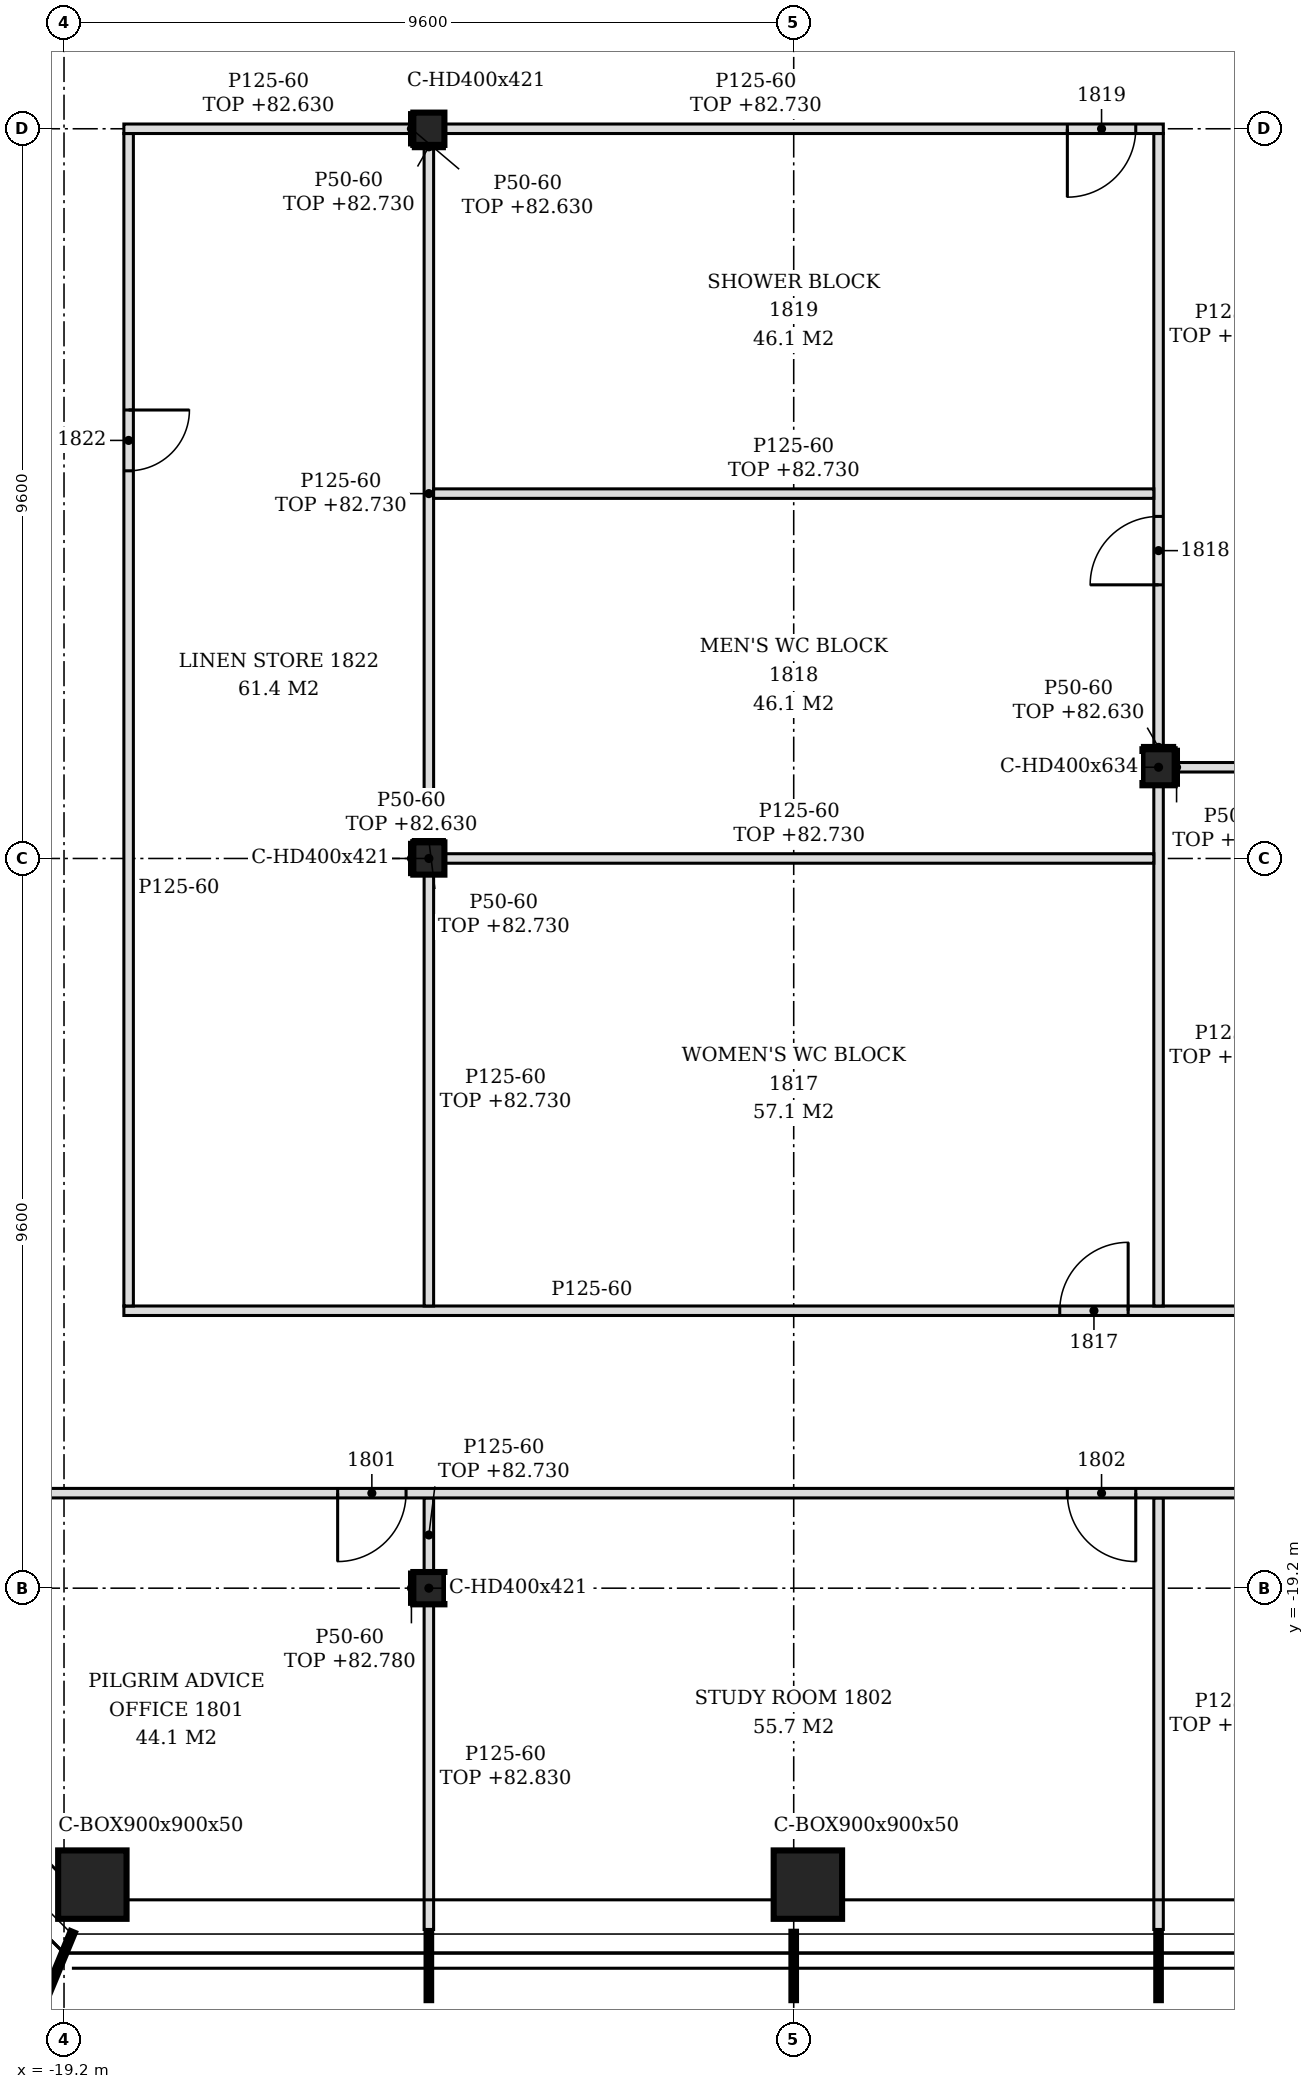
"""IFC4 building model, lengths in metres.
Left out: names, types, materials, properties, quantities, classifications, styles, units other than length and angle.
Written with IfcOpenShell. Run it as: python <this file> out.ifc"""

import sys

from ifc_helpers import new_model, si_unit, direction, frame, frame_2d, origin, origin_2d, place, context, subcontext, project, spatial, polyline, rectangle, hollow_rectangle, i_section, outline, extrude, element, fill, save


model = new_model("IFC4")
c1 = context("Model", 3, precision=1e-05, world=origin(), true_north=direction((0.0, 1.0)))
c2 = subcontext(c1, "Body", "Model", "MODEL_VIEW")
j1 = project(units=[si_unit("LENGTHUNIT", "METRE"), si_unit("PLANEANGLEUNIT", "RADIAN")], contexts=[c1])
p1 = place(None, origin())
s1 = spatial("IfcSite", under=j1, at=p1, CompositionType="ELEMENT")
p2 = place(p1, origin())
s2 = spatial("IfcBuilding", under=s1, at=p2, CompositionType="ELEMENT")
p3 = place(p2, frame((0.0, 0.0, 79.8)))
s3 = spatial("IfcBuildingStorey", under=s2, at=p3, CompositionType="ELEMENT", Elevation=79.8)
for number, where, z_axis, x_axis in (
    (1, (-18.827, -23.1, -0.15), (0.0, 0.0, 1.0), (1.0, 0.0, 0.0)),
    (2, (-9.414, -23.1, -0.15), (0.0, 0.0, 1.0), (1.0, 0.0, 0.0)),
):
    element("IfcColumn", number, at=place(p3, frame(where, z_axis=z_axis, x_axis=x_axis)), inside=s3, PredefinedType="COLUMN", context=c2, shape_type="SweptSolid", body=[
        extrude(hollow_rectangle(XDim=0.9, YDim=0.9, WallThickness=0.05, at=origin_2d()), origin(), (0.0, 0.0, 1.0), 3.6),
    ])
p4 = place(p3, frame((-4.8, -8.4, -0.15), z_axis=(0.0, 0.0, 1.0), x_axis=(1.0, 0.0, 0.0)))
e3 = element("IfcColumn", 3, at=p4, inside=s3, PredefinedType="COLUMN", context=c2, shape_type="SweptSolid", body=[
    extrude(i_section(OverallWidth=0.424, OverallDepth=0.474, WebThickness=0.048, FlangeThickness=0.077, FilletRadius=0.015, at=origin_2d()), origin(), (0.0, 0.0, 1.0), 3.6),
])
for number, where, z_axis, x_axis in (
    (4, (-14.4, -19.2, -0.15), (0.0, 0.0, 1.0), (1.0, 0.0, 0.0)),
    (5, (-14.4, -9.6, -0.15), (0.0, 0.0, 1.0), (1.0, 0.0, 0.0)),
    (6, (-14.4, 0.0, -0.15), (0.0, 0.0, 1.0), (1.0, 0.0, 0.0)),
):
    element("IfcColumn", number, at=place(p3, frame(where, z_axis=z_axis, x_axis=x_axis)), inside=s3, PredefinedType="COLUMN", context=c2, shape_type="SweptSolid", body=[
        extrude(i_section(OverallWidth=0.409, OverallDepth=0.425, WebThickness=0.033, FlangeThickness=0.052, FilletRadius=0.015, at=origin_2d()), origin(), (0.0, 0.0, 1.0), 3.6),
    ])
p5 = place(p3, frame((-14.4, -23.69, 0.0), z_axis=(0.0, 0.0, 1.0), x_axis=(0.0, 1.0, 0.0)))
e7 = element("IfcWall", 7, at=p5, inside=s3, PredefinedType="PARTITIONING", context=c2, shape_type="SweptSolid", body=[
    extrude(outline(polyline([(0.0, 0.0), (4.277, 0.0), (4.278, 3.03), (0.74, 3.03), (0.738, 2.93), (0.44, 2.93), (0.438, 3.03), (0.0, 3.03), (0.0, 0.0)])), frame((0.0, 0.062, 0.0), z_axis=(0.0, -1.0, 0.0), x_axis=(1.0, 0.0, 0.0)), (0.0, 0.0, 1.0), 0.125),
])
p6 = place(p3, frame((-4.8, -23.69, 0.0), z_axis=(0.0, 0.0, 1.0), x_axis=(0.0, 1.0, 0.0)))
e8 = element("IfcWall", 8, at=p6, inside=s3, PredefinedType="PARTITIONING", context=c2, shape_type="SweptSolid", body=[
    extrude(rectangle(XDim=5.677, YDim=0.125, at=frame_2d((2.839, 0.0))), origin(), (0.0, 0.0, 1.0), 2.73),
])
p7 = place(p3, frame((-14.4, -18.988, 0.0), z_axis=(0.0, 0.0, 1.0), x_axis=(0.0, 1.0, 0.0)))
e9 = element("IfcWall", 9, at=p7, inside=s3, PredefinedType="PARTITIONING", context=c2, shape_type="SweptSolid", body=[
    extrude(rectangle(XDim=0.975, YDim=0.125, at=frame_2d((0.488, 0.0))), origin(), (0.0, 0.0, 1.0), 2.93),
])
p8 = place(p3, frame((-20.75, -17.95, 0.0), z_axis=(0.0, 0.0, 1.0), x_axis=(1.0, 0.0, 0.0)))
e10 = element("IfcWall", 10, at=p8, inside=s3, PredefinedType="PARTITIONING", context=c2, shape_type="SweptSolid", body=[
    extrude(outline(polyline([(0.0, 0.0), (39.887, 0.0), (39.887, 2.73), (39.8, 2.73), (39.798, 3.45), (28.1, 3.45), (28.098, 2.73), (27.8, 2.73), (27.798, 3.45), (16.1, 3.45), (16.098, 2.73), (15.8, 2.73), (15.798, 3.45), (6.5, 3.45), (6.498, 2.93), (6.2, 2.93), (6.198, 3.45), (0.0, 3.45), (0.0, 0.0)])), frame((0.0, 0.062, 0.0), z_axis=(0.0, -1.0, 0.0), x_axis=(1.0, 0.0, 0.0)), (0.0, 0.0, 1.0), 0.125),
])
p9 = place(p8, frame((5.15, 0.0, 0.0)))
e11 = element("IfcOpeningElement", 11, at=p9, cuts=e10, PredefinedType="OPENING", context=c2, shape_type="SweptSolid", body=[
    extrude(rectangle(XDim=0.9, YDim=2.1, at=frame_2d((0.45, 1.05))), frame((0.0, 0.073, 0.0), z_axis=(0.0, -1.0, 0.0), x_axis=(1.0, 0.0, 0.0)), (0.0, 0.0, 1.0), 0.145),
])
p10 = place(p8, frame((14.75, 0.0, 0.0)))
e12 = element("IfcOpeningElement", 12, at=p10, cuts=e10, PredefinedType="OPENING", context=c2, shape_type="SweptSolid", body=[
    extrude(rectangle(XDim=0.9, YDim=2.1, at=frame_2d((0.45, 1.05))), frame((0.0, 0.073, 0.0), z_axis=(0.0, -1.0, 0.0), x_axis=(1.0, 0.0, 0.0)), (0.0, 0.0, 1.0), 0.145),
])
p11 = place(p8, frame((24.35, 0.0, 0.0)))
e13 = element("IfcOpeningElement", 13, at=p11, cuts=e10, PredefinedType="OPENING", context=c2, shape_type="SweptSolid", body=[
    extrude(rectangle(XDim=0.9, YDim=2.1, at=frame_2d((0.45, 1.05))), frame((0.0, 0.073, 0.0), z_axis=(0.0, -1.0, 0.0), x_axis=(1.0, 0.0, 0.0)), (0.0, 0.0, 1.0), 0.145),
])
p12 = place(p8, frame((29.75, 0.0, 0.0)))
e14 = element("IfcOpeningElement", 14, at=p12, cuts=e10, PredefinedType="OPENING", context=c2, shape_type="SweptSolid", body=[
    extrude(rectangle(XDim=0.9, YDim=2.1, at=frame_2d((0.45, 1.05))), frame((0.0, 0.073, 0.0), z_axis=(0.0, -1.0, 0.0), x_axis=(1.0, 0.0, 0.0)), (0.0, 0.0, 1.0), 0.145),
])
p13 = place(p8, frame((35.45, 0.0, 0.0)))
e15 = element("IfcOpeningElement", 15, at=p13, cuts=e10, PredefinedType="OPENING", context=c2, shape_type="SweptSolid", body=[
    extrude(rectangle(XDim=0.9, YDim=2.1, at=frame_2d((0.45, 1.05))), frame((0.0, 0.073, 0.0), z_axis=(0.0, -1.0, 0.0), x_axis=(1.0, 0.0, 0.0)), (0.0, 0.0, 1.0), 0.145),
])
p14 = place(p3, frame((-18.413, -15.55, 0.0), z_axis=(0.0, 0.0, 1.0), x_axis=(1.0, 0.0, 0.0)))
e16 = element("IfcWall", 16, at=p14, inside=s3, PredefinedType="PARTITIONING", context=c2, shape_type="SweptSolid", body=[
    extrude(outline(polyline([(0.0, 0.0), (18.475, 0.0), (18.475, 3.45), (13.762, 3.45), (13.76, 2.73), (13.462, 2.73), (13.46, 3.45), (4.163, 3.45), (4.16, 2.93), (3.863, 2.93), (3.861, 3.45), (0.0, 3.45), (0.0, 0.0)])), frame((0.0, 0.062, 0.0), z_axis=(0.0, -1.0, 0.0), x_axis=(1.0, 0.0, 0.0)), (0.0, 0.0, 1.0), 0.125),
])
p15 = place(p14, frame((12.312, 0.0, 0.0)))
e17 = element("IfcOpeningElement", 17, at=p15, cuts=e16, PredefinedType="OPENING", context=c2, shape_type="SweptSolid", body=[
    extrude(rectangle(XDim=0.9, YDim=2.1, at=frame_2d((0.45, 1.05))), frame((0.0, 0.073, 0.0), z_axis=(0.0, -1.0, 0.0), x_axis=(1.0, 0.0, 0.0)), (0.0, 0.0, 1.0), 0.145),
])
p16 = place(p3, frame((-18.35, -15.488, 0.0), z_axis=(0.0, 0.0, 1.0), x_axis=(0.0, 1.0, 0.0)))
e18 = element("IfcWall", 18, at=p16, inside=s3, PredefinedType="PARTITIONING", context=c2, shape_type="SweptSolid", body=[
    extrude(outline(polyline([(0.0, 0.0), (15.425, 0.0), (15.425, 2.83), (15.377, 2.83), (15.375, 3.45), (10.798, 3.45), (10.795, 2.83), (10.577, 2.83), (10.575, 3.45), (5.998, 3.45), (5.996, 2.83), (5.778, 2.83), (5.775, 3.45), (1.198, 3.45), (1.196, 2.83), (0.978, 2.83), (0.976, 3.45), (0.0, 3.45), (0.0, 0.0)])), frame((0.0, 0.062, 0.0), z_axis=(0.0, -1.0, 0.0), x_axis=(1.0, 0.0, 0.0)), (0.0, 0.0, 1.0), 0.125),
])
p17 = place(p16, frame((10.988, 0.0, 0.0)))
e19 = element("IfcOpeningElement", 19, at=p17, cuts=e18, PredefinedType="OPENING", context=c2, shape_type="SweptSolid", body=[
    extrude(rectangle(XDim=0.8, YDim=2.1, at=frame_2d((0.4, 1.05))), frame((0.0, 0.073, 0.0), z_axis=(0.0, -1.0, 0.0), x_axis=(1.0, 0.0, 0.0)), (0.0, 0.0, 1.0), 0.145),
])
p18 = place(p3, frame((-14.4, -15.488, 0.0), z_axis=(0.0, 0.0, 1.0), x_axis=(0.0, 1.0, 0.0)))
e20 = element("IfcWall", 20, at=p18, inside=s3, PredefinedType="PARTITIONING", context=c2, shape_type="SweptSolid", body=[
    extrude(rectangle(XDim=5.675, YDim=0.125, at=frame_2d((2.837, 0.0))), origin(), (0.0, 0.0, 1.0), 2.93),
])
p19 = place(p3, frame((-4.8, -15.488, 0.0), z_axis=(0.0, 0.0, 1.0), x_axis=(0.0, 1.0, 0.0)))
e21 = element("IfcWall", 21, at=p19, inside=s3, PredefinedType="PARTITIONING", context=c2, shape_type="SweptSolid", body=[
    extrude(rectangle(XDim=6.851, YDim=0.125, at=frame_2d((3.425, 0.0))), origin(), (0.0, 0.0, 1.0), 2.73),
])
p20 = place(p3, frame((-14.196, -9.6, 0.0), z_axis=(0.0, 0.0, 1.0), x_axis=(1.0, 0.0, 0.0)))
e22 = element("IfcWall", 22, at=p20, inside=s3, PredefinedType="PARTITIONING", context=c2, shape_type="SweptSolid", body=[
    extrude(outline(polyline([(0.0, 0.0), (9.333, 0.0), (9.333, 2.73), (9.246, 2.73), (9.243, 2.93), (0.0, 2.93), (0.0, 0.0)])), frame((0.0, 0.062, 0.0), z_axis=(0.0, -1.0, 0.0), x_axis=(1.0, 0.0, 0.0)), (0.0, 0.0, 1.0), 0.125),
])
p21 = place(p3, frame((-14.4, -9.387, 0.0), z_axis=(0.0, 0.0, 1.0), x_axis=(0.0, 1.0, 0.0)))
e23 = element("IfcWall", 23, at=p21, inside=s3, PredefinedType="PARTITIONING", context=c2, shape_type="SweptSolid", body=[
    extrude(rectangle(XDim=9.175, YDim=0.125, at=frame_2d((4.587, 0.0))), origin(), (0.0, 0.0, 1.0), 2.93),
])
p22 = place(p3, frame((-4.588, -8.4, 0.0), z_axis=(0.0, 0.0, 1.0), x_axis=(1.0, 0.0, 0.0)))
e24 = element("IfcWall", 24, at=p22, inside=s3, PredefinedType="PARTITIONING", context=c2, shape_type="SweptSolid", body=[
    extrude(rectangle(XDim=4.65, YDim=0.125, at=frame_2d((2.325, 0.0))), origin(), (0.0, 0.0, 1.0), 2.83),
])
p23 = place(p3, frame((-4.8, -8.163, 0.0), z_axis=(0.0, 0.0, 1.0), x_axis=(0.0, 1.0, 0.0)))
e25 = element("IfcWall", 25, at=p23, inside=s3, PredefinedType="PARTITIONING", context=c2, shape_type="SweptSolid", body=[
    extrude(rectangle(XDim=8.101, YDim=0.125, at=frame_2d((4.05, 0.0))), origin(), (0.0, 0.0, 1.0), 2.83),
])
p24 = place(p23, frame((2.163, 0.0, 0.0)))
e26 = element("IfcOpeningElement", 26, at=p24, cuts=e25, PredefinedType="OPENING", context=c2, shape_type="SweptSolid", body=[
    extrude(rectangle(XDim=0.9, YDim=2.1, at=frame_2d((0.45, 1.05))), frame((0.0, 0.073, 0.0), z_axis=(0.0, -1.0, 0.0), x_axis=(1.0, 0.0, 0.0)), (0.0, 0.0, 1.0), 0.145),
])
p25 = place(p3, frame((-14.337, -4.8, 0.0), z_axis=(0.0, 0.0, 1.0), x_axis=(1.0, 0.0, 0.0)))
e27 = element("IfcWall", 27, at=p25, inside=s3, PredefinedType="PARTITIONING", context=c2, shape_type="SweptSolid", body=[
    extrude(outline(polyline([(0.0, 0.0), (9.475, 0.0), (9.475, 2.83), (9.387, 2.83), (9.385, 2.93), (0.0, 2.93), (0.0, 0.0)])), frame((0.0, 0.062, 0.0), z_axis=(0.0, -1.0, 0.0), x_axis=(1.0, 0.0, 0.0)), (0.0, 0.0, 1.0), 0.125),
])
p26 = place(p3, frame((-18.413, 0.0, 0.0), z_axis=(0.0, 0.0, 1.0), x_axis=(1.0, 0.0, 0.0)))
e28 = element("IfcWall", 28, at=p26, inside=s3, PredefinedType="PARTITIONING", context=c2, shape_type="SweptSolid", body=[
    extrude(rectangle(XDim=3.808, YDim=0.125, at=frame_2d((1.904, 0.0))), origin(), (0.0, 0.0, 1.0), 2.83),
])
p27 = place(p3, frame((-14.196, 0.0, 0.0), z_axis=(0.0, 0.0, 1.0), x_axis=(1.0, 0.0, 0.0)))
e29 = element("IfcWall", 29, at=p27, inside=s3, PredefinedType="PARTITIONING", context=c2, shape_type="SweptSolid", body=[
    extrude(outline(polyline([(0.0, 0.0), (9.458, 0.0), (9.458, 2.83), (9.246, 2.83), (9.243, 2.93), (0.0, 2.93), (0.0, 0.0)])), frame((0.0, 0.062, 0.0), z_axis=(0.0, -1.0, 0.0), x_axis=(1.0, 0.0, 0.0)), (0.0, 0.0, 1.0), 0.125),
])
p28 = place(p27, frame((8.196, 0.0, 0.0)))
e30 = element("IfcOpeningElement", 30, at=p28, cuts=e29, PredefinedType="OPENING", context=c2, shape_type="SweptSolid", body=[
    extrude(rectangle(XDim=0.9, YDim=2.1, at=frame_2d((0.45, 1.05))), frame((0.0, 0.073, 0.0), z_axis=(0.0, -1.0, 0.0), x_axis=(1.0, 0.0, 0.0)), (0.0, 0.0, 1.0), 0.145),
])
p29 = place(p3, frame((-14.629, -19.413, 0.0), z_axis=(0.0, 0.0, 1.0), x_axis=(0.0, 1.0, 0.0)))
e31 = element("IfcWall", 31, at=p29, inside=s3, PredefinedType="PARTITIONING", context=c2, shape_type="SweptSolid", body=[
    extrude(rectangle(XDim=0.425, YDim=0.05, at=frame_2d((0.212, 0.0))), origin(), (0.0, 0.0, 1.0), 2.98),
])
p30 = place(p3, frame((-14.629, -9.812, 0.0), z_axis=(0.0, 0.0, 1.0), x_axis=(0.0, 1.0, 0.0)))
e32 = element("IfcWall", 32, at=p30, inside=s3, PredefinedType="PARTITIONING", context=c2, shape_type="SweptSolid", body=[
    extrude(rectangle(XDim=0.425, YDim=0.05, at=frame_2d((0.212, 0.0))), origin(), (0.0, 0.0, 1.0), 2.83),
])
p31 = place(p3, frame((-14.629, -0.212, 0.0), z_axis=(0.0, 0.0, 1.0), x_axis=(0.0, 1.0, 0.0)))
e33 = element("IfcWall", 33, at=p31, inside=s3, PredefinedType="PARTITIONING", context=c2, shape_type="SweptSolid", body=[
    extrude(rectangle(XDim=0.425, YDim=0.05, at=frame_2d((0.212, 0.0))), origin(), (0.0, 0.0, 1.0), 2.83),
])
p32 = place(p3, frame((-4.563, -8.637, 0.0), z_axis=(0.0, 0.0, 1.0), x_axis=(0.0, 1.0, 0.0)))
e34 = element("IfcWall", 34, at=p32, inside=s3, PredefinedType="PARTITIONING", context=c2, shape_type="SweptSolid", body=[
    extrude(rectangle(XDim=0.474, YDim=0.05, at=frame_2d((0.237, 0.0))), origin(), (0.0, 0.0, 1.0), 2.83),
])
p33 = place(p3, frame((-14.604, -9.363, 0.0), z_axis=(0.0, 0.0, 1.0), x_axis=(1.0, 0.0, 0.0)))
e35 = element("IfcWall", 35, at=p33, inside=s3, PredefinedType="PARTITIONING", context=c2, shape_type="SweptSolid", body=[
    extrude(rectangle(XDim=0.409, YDim=0.05, at=frame_2d((0.205, 0.0))), origin(), (0.0, 0.0, 1.0), 2.93),
])
p34 = place(p3, frame((-5.012, -8.138, 0.0), z_axis=(0.0, 0.0, 1.0), x_axis=(1.0, 0.0, 0.0)))
e36 = element("IfcWall", 36, at=p34, inside=s3, PredefinedType="PARTITIONING", context=c2, shape_type="SweptSolid", body=[
    extrude(rectangle(XDim=0.424, YDim=0.05, at=frame_2d((0.212, 0.0))), origin(), (0.0, 0.0, 1.0), 2.83),
])
p35 = place(p3, frame((-14.604, -0.238, 0.0), z_axis=(0.0, 0.0, 1.0), x_axis=(1.0, 0.0, 0.0)))
e37 = element("IfcWall", 37, at=p35, inside=s3, PredefinedType="PARTITIONING", context=c2, shape_type="SweptSolid", body=[
    extrude(rectangle(XDim=0.409, YDim=0.05, at=frame_2d((0.205, 0.0))), origin(), (0.0, 0.0, 1.0), 2.93),
])
p36 = place(p9, frame((0.9, 0.0, 0.0), z_axis=(0.0, 0.0, 1.0), x_axis=(-1.0, 0.0, 0.0)))
e38 = element("IfcDoor", 38, at=p36, inside=s3, OperationType="SINGLE_SWING_RIGHT", PredefinedType="DOOR", context=c2, shape_type="SweptSolid", body=[
    extrude(rectangle(XDim=0.9, YDim=2.1, at=frame_2d((0.45, 1.05))), frame((0.0, 0.025, 0.0), z_axis=(0.0, -1.0, 0.0), x_axis=(1.0, 0.0, 0.0)), (0.0, 0.0, 1.0), 0.05),
])
fill(e11, e38)
p37 = place(p10, frame((0.9, 0.0, 0.0), z_axis=(0.0, 0.0, 1.0), x_axis=(-1.0, 0.0, 0.0)))
e39 = element("IfcDoor", 39, at=p37, inside=s3, OperationType="SINGLE_SWING_LEFT", PredefinedType="DOOR", context=c2, shape_type="SweptSolid", body=[
    extrude(rectangle(XDim=0.9, YDim=2.1, at=frame_2d((0.45, 1.05))), frame((0.0, 0.025, 0.0), z_axis=(0.0, -1.0, 0.0), x_axis=(1.0, 0.0, 0.0)), (0.0, 0.0, 1.0), 0.05),
])
fill(e12, e39)
p38 = place(p15, origin())
e40 = element("IfcDoor", 40, at=p38, inside=s3, OperationType="SINGLE_SWING_RIGHT", PredefinedType="DOOR", context=c2, shape_type="SweptSolid", body=[
    extrude(rectangle(XDim=0.9, YDim=2.1, at=frame_2d((0.45, 1.05))), frame((0.0, 0.025, 0.0), z_axis=(0.0, -1.0, 0.0), x_axis=(1.0, 0.0, 0.0)), (0.0, 0.0, 1.0), 0.05),
])
fill(e17, e40)
p39 = place(p24, origin())
e41 = element("IfcDoor", 41, at=p39, inside=s3, OperationType="SINGLE_SWING_LEFT", PredefinedType="DOOR", context=c2, shape_type="SweptSolid", body=[
    extrude(rectangle(XDim=0.9, YDim=2.1, at=frame_2d((0.45, 1.05))), frame((0.0, 0.025, 0.0), z_axis=(0.0, -1.0, 0.0), x_axis=(1.0, 0.0, 0.0)), (0.0, 0.0, 1.0), 0.05),
])
fill(e26, e41)
p40 = place(p28, frame((0.9, 0.0, 0.0), z_axis=(0.0, 0.0, 1.0), x_axis=(-1.0, 0.0, 0.0)))
e42 = element("IfcDoor", 42, at=p40, inside=s3, OperationType="SINGLE_SWING_RIGHT", PredefinedType="DOOR", context=c2, shape_type="SweptSolid", body=[
    extrude(rectangle(XDim=0.9, YDim=2.1, at=frame_2d((0.45, 1.05))), frame((0.0, 0.025, 0.0), z_axis=(0.0, -1.0, 0.0), x_axis=(1.0, 0.0, 0.0)), (0.0, 0.0, 1.0), 0.05),
])
fill(e30, e42)
p41 = place(p17, frame((0.8, 0.0, 0.0), z_axis=(0.0, 0.0, 1.0), x_axis=(-1.0, 0.0, 0.0)))
e43 = element("IfcDoor", 43, at=p41, inside=s3, OperationType="SINGLE_SWING_LEFT", PredefinedType="DOOR", context=c2, shape_type="SweptSolid", body=[
    extrude(rectangle(XDim=0.8, YDim=2.1, at=frame_2d((0.4, 1.05))), frame((0.0, 0.025, 0.0), z_axis=(0.0, -1.0, 0.0), x_axis=(1.0, 0.0, 0.0)), (0.0, 0.0, 1.0), 0.05),
])
fill(e19, e43)
save(model, sys.argv[1])
